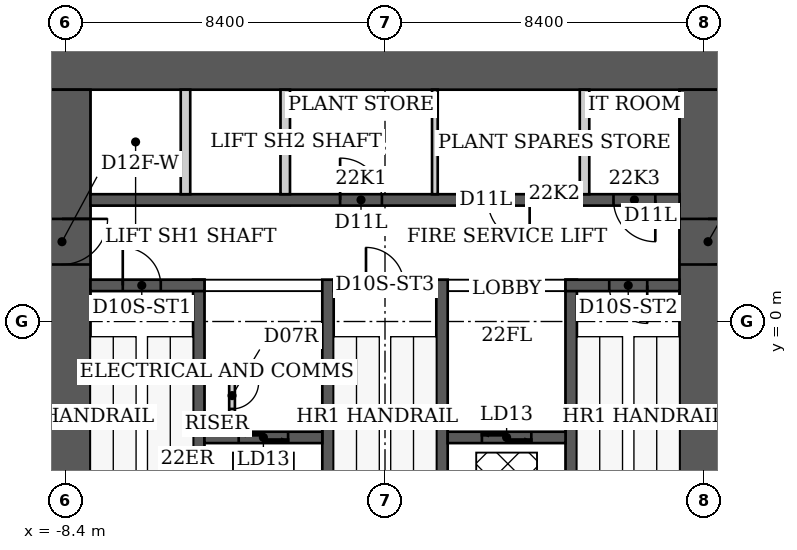
"""IFC4 building model, lengths in metres.
Left out: names, types, materials, properties, quantities, classifications, styles, units other than length and angle.
Written with IfcOpenShell. Run it as: python <this file> out.ifc"""

import sys

from ifc_helpers import new_model, si_unit, direction, frame, frame_2d, origin, place, context, subcontext, project, spatial, rectangle, extrude, element, fill, save


model = new_model("IFC4")
c1 = context("Model", 3, precision=1e-05, world=origin(), true_north=direction((0.0, 1.0)))
c2 = subcontext(c1, "Body", "Model", "MODEL_VIEW")
j1 = project(units=[si_unit("LENGTHUNIT", "METRE"), si_unit("PLANEANGLEUNIT", "RADIAN")], contexts=[c1])
p1 = place(None, origin())
s1 = spatial("IfcSite", under=j1, at=p1, CompositionType="ELEMENT")
p2 = place(p1, origin())
s2 = spatial("IfcBuilding", under=s1, at=p2, CompositionType="ELEMENT")
p3 = place(p2, frame((0.0, 0.0, 91.4)))
s3 = spatial("IfcBuildingStorey", under=s2, at=p3, CompositionType="ELEMENT", Elevation=91.4)
p4 = place(p3, frame((-9.25, 6.85, 0.0), z_axis=(0.0, 0.0, 1.0), x_axis=(1.0, 0.0, 0.0)))
e1 = element("IfcWall", 1, at=p4, inside=s3, PredefinedType="SHEAR", context=c2, shape_type="SweptSolid", body=[
    extrude(rectangle(XDim=18.5, YDim=1.5, at=frame_2d((9.25, 0.0))), origin(), (0.0, 0.0, 1.0), 5.4),
])
p5 = place(p3, frame((-8.5, -9.2, 0.0), z_axis=(0.0, 0.0, 1.0), x_axis=(0.0, 1.0, 0.0)))
e2 = element("IfcWall", 2, at=p5, inside=s3, PredefinedType="SHEAR", context=c2, shape_type="SweptSolid", body=[
    extrude(rectangle(XDim=15.3, YDim=1.5, at=frame_2d((7.65, 0.0))), origin(), (0.0, 0.0, 1.0), 5.4),
])
p6 = place(p5, frame((10.7, 0.0, 0.0)))
e3 = element("IfcOpeningElement", 3, at=p6, cuts=e2, PredefinedType="OPENING", context=c2, shape_type="SweptSolid", body=[
    extrude(rectangle(XDim=1.2, YDim=2.2, at=frame_2d((0.6, 1.1))), frame((0.0, 0.75, 0.0), z_axis=(0.0, -1.0, 0.0), x_axis=(1.0, 0.0, 0.0)), (0.0, 0.0, 1.0), 1.5),
])
p7 = place(p3, frame((8.5, -9.2, 0.0), z_axis=(0.0, 0.0, 1.0), x_axis=(0.0, 1.0, 0.0)))
e4 = element("IfcWall", 4, at=p7, inside=s3, PredefinedType="SHEAR", context=c2, shape_type="SweptSolid", body=[
    extrude(rectangle(XDim=15.3, YDim=1.5, at=frame_2d((7.65, 0.0))), origin(), (0.0, 0.0, 1.0), 5.4),
])
p8 = place(p7, frame((10.7, 0.0, 0.0)))
e5 = element("IfcOpeningElement", 5, at=p8, cuts=e4, PredefinedType="OPENING", context=c2, shape_type="SweptSolid", body=[
    extrude(rectangle(XDim=1.2, YDim=2.2, at=frame_2d((0.6, 1.1))), frame((0.0, 0.75, 0.0), z_axis=(0.0, -1.0, 0.0), x_axis=(1.0, 0.0, 0.0)), (0.0, 0.0, 1.0), 1.5),
])
for number, where, z_axis, x_axis in (
    (6, (-4.9, -6.1, 0.0), (0.0, 0.0, 1.0), (0.0, 1.0, 0.0)),
    (7, (-1.5, -6.1, 0.0), (0.0, 0.0, 1.0), (0.0, 1.0, 0.0)),
    (8, (1.5, -6.1, 0.0), (0.0, 0.0, 1.0), (0.0, 1.0, 0.0)),
    (9, (4.9, -6.1, 0.0), (0.0, 0.0, 1.0), (0.0, 1.0, 0.0)),
):
    element("IfcWall", number, at=place(p3, frame(where, z_axis=z_axis, x_axis=x_axis)), inside=s3, PredefinedType="SHEAR", context=c2, shape_type="SweptSolid", body=[
        extrude(rectangle(XDim=7.2, YDim=0.3, at=frame_2d((3.6, 0.0))), origin(), (0.0, 0.0, 1.0), 5.4),
    ])
p9 = place(p3, frame((-7.75, 0.95, 0.0), z_axis=(0.0, 0.0, 1.0), x_axis=(1.0, 0.0, 0.0)))
e10 = element("IfcWall", 10, at=p9, inside=s3, PredefinedType="SHEAR", context=c2, shape_type="SweptSolid", body=[
    extrude(rectangle(XDim=3.0, YDim=0.3, at=frame_2d((1.5, 0.0))), origin(), (0.0, 0.0, 1.0), 5.4),
])
p10 = place(p9, frame((0.85, 0.0, 0.0)))
e11 = element("IfcOpeningElement", 11, at=p10, cuts=e10, PredefinedType="OPENING", context=c2, shape_type="SweptSolid", body=[
    extrude(rectangle(XDim=1.0, YDim=2.2, at=frame_2d((0.5, 1.1))), frame((0.0, 0.15, 0.0), z_axis=(0.0, -1.0, 0.0), x_axis=(1.0, 0.0, 0.0)), (0.0, 0.0, 1.0), 0.3),
])
p11 = place(p3, frame((-1.35, 0.95, 0.0), z_axis=(0.0, 0.0, 1.0), x_axis=(1.0, 0.0, 0.0)))
e12 = element("IfcWall", 12, at=p11, inside=s3, PredefinedType="SHEAR", context=c2, shape_type="SweptSolid", body=[
    extrude(rectangle(XDim=2.7, YDim=0.3, at=frame_2d((1.35, 0.0))), origin(), (0.0, 0.0, 1.0), 5.4),
])
p12 = place(p11, frame((0.85, 0.0, 0.0)))
e13 = element("IfcOpeningElement", 13, at=p12, cuts=e12, PredefinedType="OPENING", context=c2, shape_type="SweptSolid", body=[
    extrude(rectangle(XDim=1.0, YDim=2.2, at=frame_2d((0.5, 1.1))), frame((0.0, 0.15, 0.0), z_axis=(0.0, -1.0, 0.0), x_axis=(1.0, 0.0, 0.0)), (0.0, 0.0, 1.0), 0.3),
])
p13 = place(p3, frame((4.75, 0.95, 0.0), z_axis=(0.0, 0.0, 1.0), x_axis=(1.0, 0.0, 0.0)))
e14 = element("IfcWall", 14, at=p13, inside=s3, PredefinedType="SHEAR", context=c2, shape_type="SweptSolid", body=[
    extrude(rectangle(XDim=3.0, YDim=0.3, at=frame_2d((1.5, 0.0))), origin(), (0.0, 0.0, 1.0), 5.4),
])
p14 = place(p13, frame((1.15, 0.0, 0.0)))
e15 = element("IfcOpeningElement", 15, at=p14, cuts=e14, PredefinedType="OPENING", context=c2, shape_type="SweptSolid", body=[
    extrude(rectangle(XDim=1.0, YDim=2.2, at=frame_2d((0.5, 1.1))), frame((0.0, 0.15, 0.0), z_axis=(0.0, -1.0, 0.0), x_axis=(1.0, 0.0, 0.0)), (0.0, 0.0, 1.0), 0.3),
])
p15 = place(p3, frame((-4.75, -3.05, 0.0), z_axis=(0.0, 0.0, 1.0), x_axis=(1.0, 0.0, 0.0)))
e16 = element("IfcWall", 16, at=p15, inside=s3, PredefinedType="SHEAR", context=c2, shape_type="SweptSolid", body=[
    extrude(rectangle(XDim=3.1, YDim=0.3, at=frame_2d((1.55, 0.0))), origin(), (0.0, 0.0, 1.0), 5.4),
])
p16 = place(p15, frame((0.9, 0.0, 0.0)))
e17 = element("IfcOpeningElement", 17, at=p16, cuts=e16, PredefinedType="OPENING", context=c2, shape_type="SweptSolid", body=[
    extrude(rectangle(XDim=1.3, YDim=2.1, at=frame_2d((0.65, 1.05))), frame((0.0, 0.15, 0.0), z_axis=(0.0, -1.0, 0.0), x_axis=(1.0, 0.0, 0.0)), (0.0, 0.0, 1.0), 0.3),
])
p17 = place(p3, frame((1.65, -3.05, 0.0), z_axis=(0.0, 0.0, 1.0), x_axis=(1.0, 0.0, 0.0)))
e18 = element("IfcWall", 18, at=p17, inside=s3, PredefinedType="SHEAR", context=c2, shape_type="SweptSolid", body=[
    extrude(rectangle(XDim=3.1, YDim=0.3, at=frame_2d((1.55, 0.0))), origin(), (0.0, 0.0, 1.0), 5.4),
])
p18 = place(p17, frame((0.9, 0.0, 0.0)))
e19 = element("IfcOpeningElement", 19, at=p18, cuts=e18, PredefinedType="OPENING", context=c2, shape_type="SweptSolid", body=[
    extrude(rectangle(XDim=1.3, YDim=2.1, at=frame_2d((0.65, 1.05))), frame((0.0, 0.15, 0.0), z_axis=(0.0, -1.0, 0.0), x_axis=(1.0, 0.0, 0.0)), (0.0, 0.0, 1.0), 0.3),
])
p19 = place(p3, frame((-7.75, 3.2, 0.0), z_axis=(0.0, 0.0, 1.0), x_axis=(1.0, 0.0, 0.0)))
e20 = element("IfcWall", 20, at=p19, inside=s3, PredefinedType="SHEAR", context=c2, shape_type="SweptSolid", body=[
    extrude(rectangle(XDim=15.5, YDim=0.3, at=frame_2d((7.75, 0.0))), origin(), (0.0, 0.0, 1.0), 5.4),
])
p20 = place(p19, frame((6.569, 0.0, 0.0)))
e21 = element("IfcOpeningElement", 21, at=p20, cuts=e20, PredefinedType="OPENING", context=c2, shape_type="SweptSolid", body=[
    extrude(rectangle(XDim=1.1, YDim=2.2, at=frame_2d((0.55, 1.1))), frame((0.0, 0.15, 0.0), z_axis=(0.0, -1.0, 0.0), x_axis=(1.0, 0.0, 0.0)), (0.0, 0.0, 1.0), 0.3),
])
p21 = place(p19, frame((10.456, 0.0, 0.0)))
e22 = element("IfcOpeningElement", 22, at=p21, cuts=e20, PredefinedType="OPENING", context=c2, shape_type="SweptSolid", body=[
    extrude(rectangle(XDim=1.1, YDim=2.2, at=frame_2d((0.55, 1.1))), frame((0.0, 0.15, 0.0), z_axis=(0.0, -1.0, 0.0), x_axis=(1.0, 0.0, 0.0)), (0.0, 0.0, 1.0), 0.3),
])
p22 = place(p19, frame((13.762, 0.0, 0.0)))
e23 = element("IfcOpeningElement", 23, at=p22, cuts=e20, PredefinedType="OPENING", context=c2, shape_type="SweptSolid", body=[
    extrude(rectangle(XDim=1.1, YDim=2.2, at=frame_2d((0.55, 1.1))), frame((0.0, 0.15, 0.0), z_axis=(0.0, -1.0, 0.0), x_axis=(1.0, 0.0, 0.0)), (0.0, 0.0, 1.0), 0.3),
])
for number, where, z_axis, x_axis in (
    (24, (-5.25, 3.35, 0.0), (0.0, 0.0, 1.0), (0.0, 1.0, 0.0)),
    (25, (-2.625, 3.35, 0.0), (0.0, 0.0, 1.0), (0.0, 1.0, 0.0)),
    (26, (5.25, 3.35, 0.0), (0.0, 0.0, 1.0), (0.0, 1.0, 0.0)),
):
    element("IfcWall", number, at=place(p3, frame(where, z_axis=z_axis, x_axis=x_axis)), inside=s3, PredefinedType="PARTITIONING", context=c2, shape_type="SweptSolid", body=[
        extrude(rectangle(XDim=2.75, YDim=0.25, at=frame_2d((1.375, 0.0))), origin(), (0.0, 0.0, 1.0), 5.4),
    ])
p23 = place(p3, frame((-4.025, -2.9, 0.0), z_axis=(0.0, 0.0, 1.0), x_axis=(0.0, 1.0, 0.0)))
e27 = element("IfcWall", 27, at=p23, inside=s3, PredefinedType="PARTITIONING", context=c2, shape_type="SweptSolid", body=[
    extrude(rectangle(XDim=1.775, YDim=0.15, at=frame_2d((0.887, 0.0))), origin(), (0.0, 0.0, 1.0), 5.24),
])
p24 = place(p23, frame((0.6, 0.0, 0.0)))
e28 = element("IfcOpeningElement", 28, at=p24, cuts=e27, PredefinedType="OPENING", context=c2, shape_type="SweptSolid", body=[
    extrude(rectangle(XDim=0.7, YDim=2.1, at=frame_2d((0.35, 1.05))), frame((0.0, 0.075, 0.0), z_axis=(0.0, -1.0, 0.0), x_axis=(1.0, 0.0, 0.0)), (0.0, 0.0, 1.0), 0.15),
])
p25 = place(p3, frame((-4.75, -1.2, 0.0), z_axis=(0.0, 0.0, 1.0), x_axis=(1.0, 0.0, 0.0)))
e29 = element("IfcWall", 29, at=p25, inside=s3, PredefinedType="PARTITIONING", context=c2, shape_type="SweptSolid", body=[
    extrude(rectangle(XDim=0.8, YDim=0.15, at=frame_2d((0.4, 0.0))), origin(), (0.0, 0.0, 1.0), 5.24),
])
p26 = place(p3, frame((1.312, 3.35, 0.0), z_axis=(0.0, 0.0, 1.0), x_axis=(0.0, 1.0, 0.0)))
e30 = element("IfcWall", 30, at=p26, inside=s3, PredefinedType="PARTITIONING", context=c2, shape_type="SweptSolid", body=[
    extrude(rectangle(XDim=2.75, YDim=0.15, at=frame_2d((1.375, 0.0))), origin(), (0.0, 0.0, 1.0), 5.24),
])
p27 = place(p10, origin())
e31 = element("IfcDoor", 31, at=p27, inside=s3, OperationType="SINGLE_SWING_LEFT", PredefinedType="DOOR", context=c2, shape_type="SweptSolid", body=[
    extrude(rectangle(XDim=1.0, YDim=2.2, at=frame_2d((0.5, 1.1))), frame((0.0, 0.025, 0.0), z_axis=(0.0, -1.0, 0.0), x_axis=(1.0, 0.0, 0.0)), (0.0, 0.0, 1.0), 0.05),
])
fill(e11, e31)
p28 = place(p12, origin())
e32 = element("IfcDoor", 32, at=p28, inside=s3, OperationType="SINGLE_SWING_LEFT", PredefinedType="DOOR", context=c2, shape_type="SweptSolid", body=[
    extrude(rectangle(XDim=1.0, YDim=2.2, at=frame_2d((0.5, 1.1))), frame((0.0, 0.025, 0.0), z_axis=(0.0, -1.0, 0.0), x_axis=(1.0, 0.0, 0.0)), (0.0, 0.0, 1.0), 0.05),
])
fill(e13, e32)
p29 = place(p14, origin())
e33 = element("IfcDoor", 33, at=p29, inside=s3, OperationType="SINGLE_SWING_RIGHT", PredefinedType="DOOR", context=c2, shape_type="SweptSolid", body=[
    extrude(rectangle(XDim=1.0, YDim=2.2, at=frame_2d((0.5, 1.1))), frame((0.0, 0.025, 0.0), z_axis=(0.0, -1.0, 0.0), x_axis=(1.0, 0.0, 0.0)), (0.0, 0.0, 1.0), 0.05),
])
fill(e15, e33)
p30 = place(p6, origin())
e34 = element("IfcDoor", 34, at=p30, inside=s3, OperationType="SINGLE_SWING_RIGHT", PredefinedType="DOOR", context=c2, shape_type="SweptSolid", body=[
    extrude(rectangle(XDim=1.2, YDim=2.2, at=frame_2d((0.6, 1.1))), frame((0.0, 0.025, 0.0), z_axis=(0.0, -1.0, 0.0), x_axis=(1.0, 0.0, 0.0)), (0.0, 0.0, 1.0), 0.05),
])
fill(e3, e34)
p31 = place(p8, origin())
e35 = element("IfcDoor", 35, at=p31, inside=s3, OperationType="SINGLE_SWING_RIGHT", PredefinedType="DOOR", context=c2, shape_type="SweptSolid", body=[
    extrude(rectangle(XDim=1.2, YDim=2.2, at=frame_2d((0.6, 1.1))), frame((0.0, 0.025, 0.0), z_axis=(0.0, -1.0, 0.0), x_axis=(1.0, 0.0, 0.0)), (0.0, 0.0, 1.0), 0.05),
])
fill(e5, e35)
p32 = place(p24, origin())
e36 = element("IfcDoor", 36, at=p32, inside=s3, OperationType="SINGLE_SWING_RIGHT", PredefinedType="DOOR", context=c2, shape_type="SweptSolid", body=[
    extrude(rectangle(XDim=0.7, YDim=2.1, at=frame_2d((0.35, 1.05))), frame((0.0, 0.025, 0.0), z_axis=(0.0, -1.0, 0.0), x_axis=(1.0, 0.0, 0.0)), (0.0, 0.0, 1.0), 0.05),
])
fill(e28, e36)
p33 = place(p20, origin())
e37 = element("IfcDoor", 37, at=p33, inside=s3, OperationType="SINGLE_SWING_LEFT", PredefinedType="DOOR", context=c2, shape_type="SweptSolid", body=[
    extrude(rectangle(XDim=1.1, YDim=2.2, at=frame_2d((0.55, 1.1))), frame((0.0, 0.025, 0.0), z_axis=(0.0, -1.0, 0.0), x_axis=(1.0, 0.0, 0.0)), (0.0, 0.0, 1.0), 0.05),
])
fill(e21, e37)
p34 = place(p21, origin())
e38 = element("IfcDoor", 38, at=p34, inside=s3, OperationType="SINGLE_SWING_RIGHT", PredefinedType="DOOR", context=c2, shape_type="SweptSolid", body=[
    extrude(rectangle(XDim=1.1, YDim=2.2, at=frame_2d((0.55, 1.1))), frame((0.0, 0.025, 0.0), z_axis=(0.0, -1.0, 0.0), x_axis=(1.0, 0.0, 0.0)), (0.0, 0.0, 1.0), 0.05),
])
fill(e22, e38)
p35 = place(p22, origin())
e39 = element("IfcDoor", 39, at=p35, inside=s3, OperationType="SINGLE_SWING_RIGHT", PredefinedType="DOOR", context=c2, shape_type="SweptSolid", body=[
    extrude(rectangle(XDim=1.1, YDim=2.2, at=frame_2d((0.55, 1.1))), frame((0.0, 0.025, 0.0), z_axis=(0.0, -1.0, 0.0), x_axis=(1.0, 0.0, 0.0)), (0.0, 0.0, 1.0), 0.05),
])
fill(e23, e39)
p36 = place(p16, origin())
e40 = element("IfcDoor", 40, at=p36, inside=s3, OperationType="DOUBLE_DOOR_SLIDING", PredefinedType="DOOR", context=c2, shape_type="SweptSolid", body=[
    extrude(rectangle(XDim=1.3, YDim=2.1, at=frame_2d((0.65, 1.05))), frame((0.0, 0.025, 0.0), z_axis=(0.0, -1.0, 0.0), x_axis=(1.0, 0.0, 0.0)), (0.0, 0.0, 1.0), 0.05),
])
fill(e17, e40)
p37 = place(p18, origin())
e41 = element("IfcDoor", 41, at=p37, inside=s3, OperationType="DOUBLE_DOOR_SLIDING", PredefinedType="DOOR", context=c2, shape_type="SweptSolid", body=[
    extrude(rectangle(XDim=1.3, YDim=2.1, at=frame_2d((0.65, 1.05))), frame((0.0, 0.025, 0.0), z_axis=(0.0, -1.0, 0.0), x_axis=(1.0, 0.0, 0.0)), (0.0, 0.0, 1.0), 0.05),
])
fill(e19, e41)
save(model, sys.argv[1])
